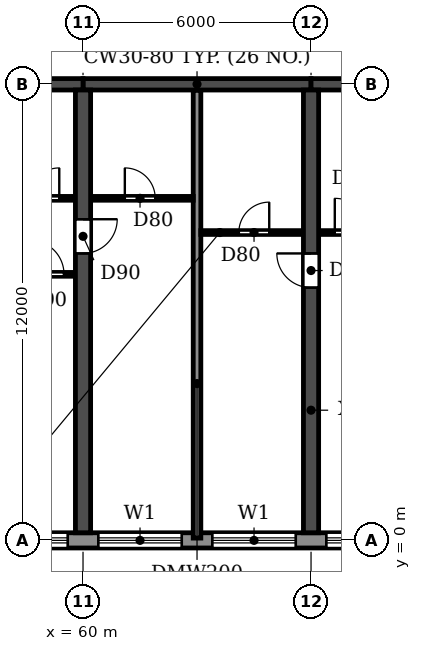
"""IFC4 building model, lengths in metres.
Left out: names, types, materials, properties, quantities, classifications, styles, units other than length and angle.
Written with IfcOpenShell. Run it as: python <this file> out.ifc"""

import sys

from ifc_helpers import new_model, si_unit, direction, frame, frame_2d, origin, place, context, subcontext, project, spatial, rectangle, extrude, element, fill, save


model = new_model("IFC4")
c1 = context("Model", 3, precision=1e-05, world=origin(), true_north=direction((0.0, 1.0)))
c2 = subcontext(c1, "Body", "Model", "MODEL_VIEW")
j1 = project(units=[si_unit("LENGTHUNIT", "METRE"), si_unit("PLANEANGLEUNIT", "RADIAN")], contexts=[c1])
p1 = place(None, origin())
s1 = spatial("IfcSite", under=j1, at=p1, CompositionType="ELEMENT")
p2 = place(p1, origin())
s2 = spatial("IfcBuilding", under=s1, at=p2, CompositionType="ELEMENT")
p3 = place(p2, frame((0.0, 0.0, 56.4)))
s3 = spatial("IfcBuildingStorey", under=s2, at=p3, CompositionType="ELEMENT", Elevation=56.4)
p4 = place(p3, frame((60.0, 0.2, 0.0), z_axis=(0.0, 0.0, 1.0), x_axis=(0.0, 1.0, 0.0)))
e1 = element("IfcWall", 1, at=p4, inside=s3, PredefinedType="SHEAR", context=c2, shape_type="SweptSolid", body=[
    extrude(rectangle(XDim=11.65, YDim=0.4, at=frame_2d((5.825, 0.0))), origin(), (0.0, 0.0, 1.0), 3.05),
])
p5 = place(p4, frame((7.35, 0.0, 0.0)))
e2 = element("IfcOpeningElement", 2, at=p5, cuts=e1, PredefinedType="OPENING", context=c2, shape_type="SweptSolid", body=[
    extrude(rectangle(XDim=0.9, YDim=2.1, at=frame_2d((0.45, 1.05))), frame((0.0, 0.21, 0.0), z_axis=(0.0, -1.0, 0.0), x_axis=(1.0, 0.0, 0.0)), (0.0, 0.0, 1.0), 0.42),
])
p6 = place(p3, frame((66.0, 0.2, 0.0), z_axis=(0.0, 0.0, 1.0), x_axis=(0.0, 1.0, 0.0)))
e3 = element("IfcWall", 3, at=p6, inside=s3, PredefinedType="SHEAR", context=c2, shape_type="SweptSolid", body=[
    extrude(rectangle(XDim=11.65, YDim=0.4, at=frame_2d((5.825, 0.0))), origin(), (0.0, 0.0, 1.0), 3.05),
])
p7 = place(p6, frame((6.45, 0.0, 0.0)))
e4 = element("IfcOpeningElement", 4, at=p7, cuts=e3, PredefinedType="OPENING", context=c2, shape_type="SweptSolid", body=[
    extrude(rectangle(XDim=0.9, YDim=2.1, at=frame_2d((0.45, 1.05))), frame((0.0, 0.21, 0.0), z_axis=(0.0, -1.0, 0.0), x_axis=(1.0, 0.0, 0.0)), (0.0, 0.0, 1.0), 0.42),
])
p8 = place(p3, frame((54.0, 12.0, 0.0), z_axis=(0.0, 0.0, 1.0), x_axis=(1.0, 0.0, 0.0)))
e5 = element("IfcWall", 5, at=p8, inside=s3, PredefinedType="SHEAR", context=c2, shape_type="SweptSolid", body=[
    extrude(rectangle(XDim=6.0, YDim=0.3, at=frame_2d((3.0, 0.0))), origin(), (0.0, 0.0, 1.0), 2.45),
])
p9 = place(p8, frame((2.55, 0.0, 0.0)))
e6 = element("IfcOpeningElement", 6, at=p9, cuts=e5, PredefinedType="OPENING", context=c2, shape_type="SweptSolid", body=[
    extrude(rectangle(XDim=1.0, YDim=2.1, at=frame_2d((0.5, 1.05))), frame((0.0, 0.16, 0.0), z_axis=(0.0, -1.0, 0.0), x_axis=(1.0, 0.0, 0.0)), (0.0, 0.0, 1.0), 0.32),
])
p10 = place(p3, frame((60.0, 12.0, 0.0), z_axis=(0.0, 0.0, 1.0), x_axis=(1.0, 0.0, 0.0)))
e7 = element("IfcWall", 7, at=p10, inside=s3, PredefinedType="SHEAR", context=c2, shape_type="SweptSolid", body=[
    extrude(rectangle(XDim=6.0, YDim=0.3, at=frame_2d((3.0, 0.0))), origin(), (0.0, 0.0, 1.0), 2.45),
])
p11 = place(p3, frame((66.0, 12.0, 0.0), z_axis=(0.0, 0.0, 1.0), x_axis=(1.0, 0.0, 0.0)))
e8 = element("IfcWall", 8, at=p11, inside=s3, PredefinedType="SHEAR", context=c2, shape_type="SweptSolid", body=[
    extrude(rectangle(XDim=6.0, YDim=0.3, at=frame_2d((3.0, 0.0))), origin(), (0.0, 0.0, 1.0), 2.45),
])
p12 = place(p11, frame((2.55, 0.0, 0.0)))
e9 = element("IfcOpeningElement", 9, at=p12, cuts=e8, PredefinedType="OPENING", context=c2, shape_type="SweptSolid", body=[
    extrude(rectangle(XDim=1.0, YDim=2.1, at=frame_2d((0.5, 1.05))), frame((0.0, 0.16, 0.0), z_axis=(0.0, -1.0, 0.0), x_axis=(1.0, 0.0, 0.0)), (0.0, 0.0, 1.0), 0.32),
])
p13 = place(p3, frame((10.683, 0.0, 0.0), z_axis=(0.0, 0.0, 1.0), x_axis=(1.0, 0.0, 0.0)))
e10 = element("IfcWall", 10, at=p13, inside=s3, PredefinedType="STANDARD", context=c2, shape_type="SweptSolid", body=[
    extrude(rectangle(XDim=80.634, YDim=0.4, at=frame_2d((40.317, 0.0))), origin(), (0.0, 0.0, 1.0), 3.05),
])
p14 = place(p13, frame((1.717, 0.0, 0.9)))
e11 = element("IfcOpeningElement", 11, at=p14, cuts=e10, PredefinedType="OPENING", context=c2, shape_type="SweptSolid", body=[
    extrude(rectangle(XDim=2.2, YDim=1.5, at=frame_2d((1.1, 0.75))), frame((0.0, 0.21, 0.0), z_axis=(0.0, -1.0, 0.0), x_axis=(1.0, 0.0, 0.0)), (0.0, 0.0, 1.0), 0.42),
])
p15 = place(p13, frame((4.917, 0.0, 0.0)))
e12 = element("IfcOpeningElement", 12, at=p15, cuts=e10, PredefinedType="OPENING", context=c2, shape_type="SweptSolid", body=[
    extrude(rectangle(XDim=1.8, YDim=2.4, at=frame_2d((0.9, 1.2))), frame((0.0, 0.21, 0.0), z_axis=(0.0, -1.0, 0.0), x_axis=(1.0, 0.0, 0.0)), (0.0, 0.0, 1.0), 0.42),
])
p16 = place(p13, frame((7.717, 0.0, 0.9)))
e13 = element("IfcOpeningElement", 13, at=p16, cuts=e10, PredefinedType="OPENING", context=c2, shape_type="SweptSolid", body=[
    extrude(rectangle(XDim=2.2, YDim=1.5, at=frame_2d((1.1, 0.75))), frame((0.0, 0.21, 0.0), z_axis=(0.0, -1.0, 0.0), x_axis=(1.0, 0.0, 0.0)), (0.0, 0.0, 1.0), 0.42),
])
p17 = place(p13, frame((10.717, 0.0, 0.9)))
e14 = element("IfcOpeningElement", 14, at=p17, cuts=e10, PredefinedType="OPENING", context=c2, shape_type="SweptSolid", body=[
    extrude(rectangle(XDim=2.2, YDim=1.5, at=frame_2d((1.1, 0.75))), frame((0.0, 0.21, 0.0), z_axis=(0.0, -1.0, 0.0), x_axis=(1.0, 0.0, 0.0)), (0.0, 0.0, 1.0), 0.42),
])
p18 = place(p13, frame((13.717, 0.0, 0.9)))
e15 = element("IfcOpeningElement", 15, at=p18, cuts=e10, PredefinedType="OPENING", context=c2, shape_type="SweptSolid", body=[
    extrude(rectangle(XDim=2.2, YDim=1.5, at=frame_2d((1.1, 0.75))), frame((0.0, 0.21, 0.0), z_axis=(0.0, -1.0, 0.0), x_axis=(1.0, 0.0, 0.0)), (0.0, 0.0, 1.0), 0.42),
])
p19 = place(p13, frame((16.917, 0.0, 0.0)))
e16 = element("IfcOpeningElement", 16, at=p19, cuts=e10, PredefinedType="OPENING", context=c2, shape_type="SweptSolid", body=[
    extrude(rectangle(XDim=1.8, YDim=2.4, at=frame_2d((0.9, 1.2))), frame((0.0, 0.21, 0.0), z_axis=(0.0, -1.0, 0.0), x_axis=(1.0, 0.0, 0.0)), (0.0, 0.0, 1.0), 0.42),
])
p20 = place(p13, frame((19.717, 0.0, 0.9)))
e17 = element("IfcOpeningElement", 17, at=p20, cuts=e10, PredefinedType="OPENING", context=c2, shape_type="SweptSolid", body=[
    extrude(rectangle(XDim=2.2, YDim=1.5, at=frame_2d((1.1, 0.75))), frame((0.0, 0.21, 0.0), z_axis=(0.0, -1.0, 0.0), x_axis=(1.0, 0.0, 0.0)), (0.0, 0.0, 1.0), 0.42),
])
p21 = place(p13, frame((22.717, 0.0, 0.9)))
e18 = element("IfcOpeningElement", 18, at=p21, cuts=e10, PredefinedType="OPENING", context=c2, shape_type="SweptSolid", body=[
    extrude(rectangle(XDim=2.2, YDim=1.5, at=frame_2d((1.1, 0.75))), frame((0.0, 0.21, 0.0), z_axis=(0.0, -1.0, 0.0), x_axis=(1.0, 0.0, 0.0)), (0.0, 0.0, 1.0), 0.42),
])
p22 = place(p13, frame((25.917, 0.0, 0.0)))
e19 = element("IfcOpeningElement", 19, at=p22, cuts=e10, PredefinedType="OPENING", context=c2, shape_type="SweptSolid", body=[
    extrude(rectangle(XDim=1.8, YDim=2.4, at=frame_2d((0.9, 1.2))), frame((0.0, 0.21, 0.0), z_axis=(0.0, -1.0, 0.0), x_axis=(1.0, 0.0, 0.0)), (0.0, 0.0, 1.0), 0.42),
])
p23 = place(p13, frame((28.717, 0.0, 0.9)))
e20 = element("IfcOpeningElement", 20, at=p23, cuts=e10, PredefinedType="OPENING", context=c2, shape_type="SweptSolid", body=[
    extrude(rectangle(XDim=2.2, YDim=1.5, at=frame_2d((1.1, 0.75))), frame((0.0, 0.21, 0.0), z_axis=(0.0, -1.0, 0.0), x_axis=(1.0, 0.0, 0.0)), (0.0, 0.0, 1.0), 0.42),
])
p24 = place(p13, frame((31.717, 0.0, 0.9)))
e21 = element("IfcOpeningElement", 21, at=p24, cuts=e10, PredefinedType="OPENING", context=c2, shape_type="SweptSolid", body=[
    extrude(rectangle(XDim=2.2, YDim=1.5, at=frame_2d((1.1, 0.75))), frame((0.0, 0.21, 0.0), z_axis=(0.0, -1.0, 0.0), x_axis=(1.0, 0.0, 0.0)), (0.0, 0.0, 1.0), 0.42),
])
p25 = place(p13, frame((34.717, 0.0, 0.9)))
e22 = element("IfcOpeningElement", 22, at=p25, cuts=e10, PredefinedType="OPENING", context=c2, shape_type="SweptSolid", body=[
    extrude(rectangle(XDim=2.2, YDim=1.5, at=frame_2d((1.1, 0.75))), frame((0.0, 0.21, 0.0), z_axis=(0.0, -1.0, 0.0), x_axis=(1.0, 0.0, 0.0)), (0.0, 0.0, 1.0), 0.42),
])
p26 = place(p13, frame((37.717, 0.0, 0.9)))
e23 = element("IfcOpeningElement", 23, at=p26, cuts=e10, PredefinedType="OPENING", context=c2, shape_type="SweptSolid", body=[
    extrude(rectangle(XDim=2.2, YDim=1.5, at=frame_2d((1.1, 0.75))), frame((0.0, 0.21, 0.0), z_axis=(0.0, -1.0, 0.0), x_axis=(1.0, 0.0, 0.0)), (0.0, 0.0, 1.0), 0.42),
])
p27 = place(p13, frame((40.917, 0.0, 0.0)))
e24 = element("IfcOpeningElement", 24, at=p27, cuts=e10, PredefinedType="OPENING", context=c2, shape_type="SweptSolid", body=[
    extrude(rectangle(XDim=1.8, YDim=2.4, at=frame_2d((0.9, 1.2))), frame((0.0, 0.21, 0.0), z_axis=(0.0, -1.0, 0.0), x_axis=(1.0, 0.0, 0.0)), (0.0, 0.0, 1.0), 0.42),
])
p28 = place(p13, frame((43.717, 0.0, 0.9)))
e25 = element("IfcOpeningElement", 25, at=p28, cuts=e10, PredefinedType="OPENING", context=c2, shape_type="SweptSolid", body=[
    extrude(rectangle(XDim=2.2, YDim=1.5, at=frame_2d((1.1, 0.75))), frame((0.0, 0.21, 0.0), z_axis=(0.0, -1.0, 0.0), x_axis=(1.0, 0.0, 0.0)), (0.0, 0.0, 1.0), 0.42),
])
p29 = place(p13, frame((46.717, 0.0, 0.9)))
e26 = element("IfcOpeningElement", 26, at=p29, cuts=e10, PredefinedType="OPENING", context=c2, shape_type="SweptSolid", body=[
    extrude(rectangle(XDim=2.2, YDim=1.5, at=frame_2d((1.1, 0.75))), frame((0.0, 0.21, 0.0), z_axis=(0.0, -1.0, 0.0), x_axis=(1.0, 0.0, 0.0)), (0.0, 0.0, 1.0), 0.42),
])
p30 = place(p13, frame((49.717, 0.0, 0.9)))
e27 = element("IfcOpeningElement", 27, at=p30, cuts=e10, PredefinedType="OPENING", context=c2, shape_type="SweptSolid", body=[
    extrude(rectangle(XDim=2.2, YDim=1.5, at=frame_2d((1.1, 0.75))), frame((0.0, 0.21, 0.0), z_axis=(0.0, -1.0, 0.0), x_axis=(1.0, 0.0, 0.0)), (0.0, 0.0, 1.0), 0.42),
])
p31 = place(p13, frame((52.717, 0.0, 0.9)))
e28 = element("IfcOpeningElement", 28, at=p31, cuts=e10, PredefinedType="OPENING", context=c2, shape_type="SweptSolid", body=[
    extrude(rectangle(XDim=2.2, YDim=1.5, at=frame_2d((1.1, 0.75))), frame((0.0, 0.21, 0.0), z_axis=(0.0, -1.0, 0.0), x_axis=(1.0, 0.0, 0.0)), (0.0, 0.0, 1.0), 0.42),
])
p32 = place(p13, frame((55.717, 0.0, 0.9)))
e29 = element("IfcOpeningElement", 29, at=p32, cuts=e10, PredefinedType="OPENING", context=c2, shape_type="SweptSolid", body=[
    extrude(rectangle(XDim=2.2, YDim=1.5, at=frame_2d((1.1, 0.75))), frame((0.0, 0.21, 0.0), z_axis=(0.0, -1.0, 0.0), x_axis=(1.0, 0.0, 0.0)), (0.0, 0.0, 1.0), 0.42),
])
p33 = place(p13, frame((58.717, 0.0, 0.9)))
e30 = element("IfcOpeningElement", 30, at=p33, cuts=e10, PredefinedType="OPENING", context=c2, shape_type="SweptSolid", body=[
    extrude(rectangle(XDim=2.2, YDim=1.5, at=frame_2d((1.1, 0.75))), frame((0.0, 0.21, 0.0), z_axis=(0.0, -1.0, 0.0), x_axis=(1.0, 0.0, 0.0)), (0.0, 0.0, 1.0), 0.42),
])
p34 = place(p13, frame((61.717, 0.0, 0.9)))
e31 = element("IfcOpeningElement", 31, at=p34, cuts=e10, PredefinedType="OPENING", context=c2, shape_type="SweptSolid", body=[
    extrude(rectangle(XDim=2.2, YDim=1.5, at=frame_2d((1.1, 0.75))), frame((0.0, 0.21, 0.0), z_axis=(0.0, -1.0, 0.0), x_axis=(1.0, 0.0, 0.0)), (0.0, 0.0, 1.0), 0.42),
])
p35 = place(p13, frame((64.917, 0.0, 0.0)))
e32 = element("IfcOpeningElement", 32, at=p35, cuts=e10, PredefinedType="OPENING", context=c2, shape_type="SweptSolid", body=[
    extrude(rectangle(XDim=1.8, YDim=2.4, at=frame_2d((0.9, 1.2))), frame((0.0, 0.21, 0.0), z_axis=(0.0, -1.0, 0.0), x_axis=(1.0, 0.0, 0.0)), (0.0, 0.0, 1.0), 0.42),
])
p36 = place(p13, frame((67.717, 0.0, 0.9)))
e33 = element("IfcOpeningElement", 33, at=p36, cuts=e10, PredefinedType="OPENING", context=c2, shape_type="SweptSolid", body=[
    extrude(rectangle(XDim=2.2, YDim=1.5, at=frame_2d((1.1, 0.75))), frame((0.0, 0.21, 0.0), z_axis=(0.0, -1.0, 0.0), x_axis=(1.0, 0.0, 0.0)), (0.0, 0.0, 1.0), 0.42),
])
p37 = place(p13, frame((70.717, 0.0, 0.9)))
e34 = element("IfcOpeningElement", 34, at=p37, cuts=e10, PredefinedType="OPENING", context=c2, shape_type="SweptSolid", body=[
    extrude(rectangle(XDim=2.2, YDim=1.5, at=frame_2d((1.1, 0.75))), frame((0.0, 0.21, 0.0), z_axis=(0.0, -1.0, 0.0), x_axis=(1.0, 0.0, 0.0)), (0.0, 0.0, 1.0), 0.42),
])
p38 = place(p13, frame((73.717, 0.0, 0.9)))
e35 = element("IfcOpeningElement", 35, at=p38, cuts=e10, PredefinedType="OPENING", context=c2, shape_type="SweptSolid", body=[
    extrude(rectangle(XDim=2.2, YDim=1.5, at=frame_2d((1.1, 0.75))), frame((0.0, 0.21, 0.0), z_axis=(0.0, -1.0, 0.0), x_axis=(1.0, 0.0, 0.0)), (0.0, 0.0, 1.0), 0.42),
])
p39 = place(p13, frame((76.917, 0.0, 0.0)))
e36 = element("IfcOpeningElement", 36, at=p39, cuts=e10, PredefinedType="OPENING", context=c2, shape_type="SweptSolid", body=[
    extrude(rectangle(XDim=1.8, YDim=2.4, at=frame_2d((0.9, 1.2))), frame((0.0, 0.21, 0.0), z_axis=(0.0, -1.0, 0.0), x_axis=(1.0, 0.0, 0.0)), (0.0, 0.0, 1.0), 0.42),
])
p40 = place(p3, frame((63.0, 0.06, 0.0), z_axis=(0.0, 0.0, 1.0), x_axis=(0.0, 1.0, 0.0)))
e37 = element("IfcWall", 37, at=p40, inside=s3, PredefinedType="PARTITIONING", context=c2, shape_type="SweptSolid", body=[
    extrude(rectangle(XDim=11.78, YDim=0.2, at=frame_2d((5.89, 0.0))), origin(), (0.0, 0.0, 1.0), 3.05),
])
p41 = place(p3, frame((56.95, 7.0, 0.0), z_axis=(0.0, 0.0, 1.0), x_axis=(1.0, 0.0, 0.0)))
e38 = element("IfcWall", 38, at=p41, inside=s3, PredefinedType="PARTITIONING", context=c2, shape_type="SweptSolid", body=[
    extrude(rectangle(XDim=2.84, YDim=0.1, at=frame_2d((1.42, 0.0))), origin(), (0.0, 0.0, 1.0), 3.05),
])
p42 = place(p41, frame((1.65, 0.0, 0.0)))
e39 = element("IfcOpeningElement", 39, at=p42, cuts=e38, PredefinedType="OPENING", context=c2, shape_type="SweptSolid", body=[
    extrude(rectangle(XDim=0.9, YDim=2.1, at=frame_2d((0.45, 1.05))), frame((0.0, 0.06, 0.0), z_axis=(0.0, -1.0, 0.0), x_axis=(1.0, 0.0, 0.0)), (0.0, 0.0, 1.0), 0.12),
])
p43 = place(p3, frame((63.1, 8.1, 0.0), z_axis=(0.0, 0.0, 1.0), x_axis=(1.0, 0.0, 0.0)))
e40 = element("IfcWall", 40, at=p43, inside=s3, PredefinedType="PARTITIONING", context=c2, shape_type="SweptSolid", body=[
    extrude(rectangle(XDim=2.69, YDim=0.1, at=frame_2d((1.345, 0.0))), origin(), (0.0, 0.0, 1.0), 3.05),
])
p44 = place(p43, frame((1.0, 0.0, 0.0)))
e41 = element("IfcOpeningElement", 41, at=p44, cuts=e40, PredefinedType="OPENING", context=c2, shape_type="SweptSolid", body=[
    extrude(rectangle(XDim=0.8, YDim=2.1, at=frame_2d((0.4, 1.05))), frame((0.0, 0.06, 0.0), z_axis=(0.0, -1.0, 0.0), x_axis=(1.0, 0.0, 0.0)), (0.0, 0.0, 1.0), 0.12),
])
p45 = place(p3, frame((66.21, 8.1, 0.0), z_axis=(0.0, 0.0, 1.0), x_axis=(1.0, 0.0, 0.0)))
e42 = element("IfcWall", 42, at=p45, inside=s3, PredefinedType="PARTITIONING", context=c2, shape_type="SweptSolid", body=[
    extrude(rectangle(XDim=1.99, YDim=0.1, at=frame_2d((0.995, 0.0))), origin(), (0.0, 0.0, 1.0), 3.05),
])
p46 = place(p45, frame((0.415, 0.0, 0.0)))
e43 = element("IfcOpeningElement", 43, at=p46, cuts=e42, PredefinedType="OPENING", context=c2, shape_type="SweptSolid", body=[
    extrude(rectangle(XDim=0.9, YDim=2.1, at=frame_2d((0.45, 1.05))), frame((0.0, 0.06, 0.0), z_axis=(0.0, -1.0, 0.0), x_axis=(1.0, 0.0, 0.0)), (0.0, 0.0, 1.0), 0.12),
])
p47 = place(p3, frame((57.9, 9.0, 0.0), z_axis=(0.0, 0.0, 1.0), x_axis=(1.0, 0.0, 0.0)))
e44 = element("IfcWall", 44, at=p47, inside=s3, PredefinedType="PARTITIONING", context=c2, shape_type="SweptSolid", body=[
    extrude(rectangle(XDim=1.89, YDim=0.1, at=frame_2d((0.945, 0.0))), origin(), (0.0, 0.0, 1.0), 3.05),
])
p48 = place(p47, frame((0.675, 0.0, 0.0)))
e45 = element("IfcOpeningElement", 45, at=p48, cuts=e44, PredefinedType="OPENING", context=c2, shape_type="SweptSolid", body=[
    extrude(rectangle(XDim=0.8, YDim=2.1, at=frame_2d((0.4, 1.05))), frame((0.0, 0.06, 0.0), z_axis=(0.0, -1.0, 0.0), x_axis=(1.0, 0.0, 0.0)), (0.0, 0.0, 1.0), 0.12),
])
p49 = place(p3, frame((60.21, 9.0, 0.0), z_axis=(0.0, 0.0, 1.0), x_axis=(1.0, 0.0, 0.0)))
e46 = element("IfcWall", 46, at=p49, inside=s3, PredefinedType="PARTITIONING", context=c2, shape_type="SweptSolid", body=[
    extrude(rectangle(XDim=2.69, YDim=0.1, at=frame_2d((1.345, 0.0))), origin(), (0.0, 0.0, 1.0), 3.05),
])
p50 = place(p49, frame((0.89, 0.0, 0.0)))
e47 = element("IfcOpeningElement", 47, at=p50, cuts=e46, PredefinedType="OPENING", context=c2, shape_type="SweptSolid", body=[
    extrude(rectangle(XDim=0.8, YDim=2.1, at=frame_2d((0.4, 1.05))), frame((0.0, 0.06, 0.0), z_axis=(0.0, -1.0, 0.0), x_axis=(1.0, 0.0, 0.0)), (0.0, 0.0, 1.0), 0.12),
])
p51 = place(p29, origin())
e48 = element("IfcWindow", 48, at=p51, inside=s3, PartitioningType="DOUBLE_PANEL_HORIZONTAL", PredefinedType="WINDOW", context=c2, shape_type="SweptSolid", body=[
    extrude(rectangle(XDim=2.2, YDim=1.5, at=frame_2d((1.1, 0.75))), frame((0.0, 0.03, 0.0), z_axis=(0.0, -1.0, 0.0), x_axis=(1.0, 0.0, 0.0)), (0.0, 0.0, 1.0), 0.06),
])
fill(e26, e48)
p52 = place(p30, origin())
e49 = element("IfcWindow", 49, at=p52, inside=s3, PartitioningType="DOUBLE_PANEL_HORIZONTAL", PredefinedType="WINDOW", context=c2, shape_type="SweptSolid", body=[
    extrude(rectangle(XDim=2.2, YDim=1.5, at=frame_2d((1.1, 0.75))), frame((0.0, 0.03, 0.0), z_axis=(0.0, -1.0, 0.0), x_axis=(1.0, 0.0, 0.0)), (0.0, 0.0, 1.0), 0.06),
])
fill(e27, e49)
p53 = place(p31, origin())
e50 = element("IfcWindow", 50, at=p53, inside=s3, PartitioningType="DOUBLE_PANEL_HORIZONTAL", PredefinedType="WINDOW", context=c2, shape_type="SweptSolid", body=[
    extrude(rectangle(XDim=2.2, YDim=1.5, at=frame_2d((1.1, 0.75))), frame((0.0, 0.03, 0.0), z_axis=(0.0, -1.0, 0.0), x_axis=(1.0, 0.0, 0.0)), (0.0, 0.0, 1.0), 0.06),
])
fill(e28, e50)
p54 = place(p32, origin())
e51 = element("IfcWindow", 51, at=p54, inside=s3, PartitioningType="DOUBLE_PANEL_HORIZONTAL", PredefinedType="WINDOW", context=c2, shape_type="SweptSolid", body=[
    extrude(rectangle(XDim=2.2, YDim=1.5, at=frame_2d((1.1, 0.75))), frame((0.0, 0.03, 0.0), z_axis=(0.0, -1.0, 0.0), x_axis=(1.0, 0.0, 0.0)), (0.0, 0.0, 1.0), 0.06),
])
fill(e29, e51)
p55 = place(p50, origin())
e52 = element("IfcDoor", 52, at=p55, inside=s3, OperationType="SINGLE_SWING_LEFT", PredefinedType="DOOR", context=c2, shape_type="SweptSolid", body=[
    extrude(rectangle(XDim=0.8, YDim=2.1, at=frame_2d((0.4, 1.05))), frame((0.0, 0.025, 0.0), z_axis=(0.0, -1.0, 0.0), x_axis=(1.0, 0.0, 0.0)), (0.0, 0.0, 1.0), 0.05),
])
fill(e47, e52)
p56 = place(p48, origin())
e53 = element("IfcDoor", 53, at=p56, inside=s3, OperationType="SINGLE_SWING_RIGHT", PredefinedType="DOOR", context=c2, shape_type="SweptSolid", body=[
    extrude(rectangle(XDim=0.8, YDim=2.1, at=frame_2d((0.4, 1.05))), frame((0.0, 0.025, 0.0), z_axis=(0.0, -1.0, 0.0), x_axis=(1.0, 0.0, 0.0)), (0.0, 0.0, 1.0), 0.05),
])
fill(e45, e53)
p57 = place(p42, origin())
e54 = element("IfcDoor", 54, at=p57, inside=s3, OperationType="SINGLE_SWING_LEFT", PredefinedType="DOOR", context=c2, shape_type="SweptSolid", body=[
    extrude(rectangle(XDim=0.9, YDim=2.1, at=frame_2d((0.45, 1.05))), frame((0.0, 0.025, 0.0), z_axis=(0.0, -1.0, 0.0), x_axis=(1.0, 0.0, 0.0)), (0.0, 0.0, 1.0), 0.05),
])
fill(e39, e54)
p58 = place(p5, frame((0.9, 0.0, 0.0), z_axis=(0.0, 0.0, 1.0), x_axis=(-1.0, 0.0, 0.0)))
e55 = element("IfcDoor", 55, at=p58, inside=s3, OperationType="SINGLE_SWING_LEFT", PredefinedType="DOOR", context=c2, shape_type="SweptSolid", body=[
    extrude(rectangle(XDim=0.9, YDim=2.1, at=frame_2d((0.45, 1.05))), frame((0.0, 0.025, 0.0), z_axis=(0.0, -1.0, 0.0), x_axis=(1.0, 0.0, 0.0)), (0.0, 0.0, 1.0), 0.05),
])
fill(e2, e55)
p59 = place(p44, origin())
e56 = element("IfcDoor", 56, at=p59, inside=s3, OperationType="SINGLE_SWING_RIGHT", PredefinedType="DOOR", context=c2, shape_type="SweptSolid", body=[
    extrude(rectangle(XDim=0.8, YDim=2.1, at=frame_2d((0.4, 1.05))), frame((0.0, 0.025, 0.0), z_axis=(0.0, -1.0, 0.0), x_axis=(1.0, 0.0, 0.0)), (0.0, 0.0, 1.0), 0.05),
])
fill(e41, e56)
p60 = place(p7, origin())
e57 = element("IfcDoor", 57, at=p60, inside=s3, OperationType="SINGLE_SWING_RIGHT", PredefinedType="DOOR", context=c2, shape_type="SweptSolid", body=[
    extrude(rectangle(XDim=0.9, YDim=2.1, at=frame_2d((0.45, 1.05))), frame((0.0, 0.025, 0.0), z_axis=(0.0, -1.0, 0.0), x_axis=(1.0, 0.0, 0.0)), (0.0, 0.0, 1.0), 0.05),
])
fill(e4, e57)
p61 = place(p46, origin())
e58 = element("IfcDoor", 58, at=p61, inside=s3, OperationType="SINGLE_SWING_LEFT", PredefinedType="DOOR", context=c2, shape_type="SweptSolid", body=[
    extrude(rectangle(XDim=0.9, YDim=2.1, at=frame_2d((0.45, 1.05))), frame((0.0, 0.025, 0.0), z_axis=(0.0, -1.0, 0.0), x_axis=(1.0, 0.0, 0.0)), (0.0, 0.0, 1.0), 0.05),
])
fill(e43, e58)
save(model, sys.argv[1])
